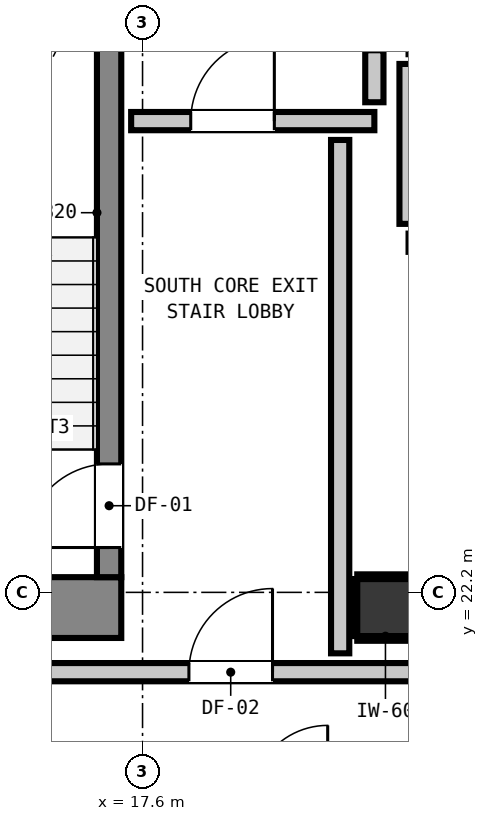
"""IFC4 building model, lengths in metres.
Left out: names, types, materials, properties, quantities, classifications, styles, units other than length and angle.
Written with IfcOpenShell. Run it as: python <this file> out.ifc"""

import sys

from ifc_helpers import new_model, si_unit, direction, frame, frame_2d, origin, origin_2d, place, context, subcontext, project, spatial, rectangle, extrude, element, fill, save


model = new_model("IFC4")
c1 = context("Model", 3, precision=1e-05, world=origin(), true_north=direction((0.0, 1.0)))
c2 = subcontext(c1, "Body", "Model", "MODEL_VIEW")
j1 = project(units=[si_unit("LENGTHUNIT", "METRE"), si_unit("PLANEANGLEUNIT", "RADIAN")], contexts=[c1])
p1 = place(None, origin())
s1 = spatial("IfcSite", under=j1, at=p1, CompositionType="ELEMENT")
p2 = place(p1, origin())
s2 = spatial("IfcBuilding", under=s1, at=p2, CompositionType="ELEMENT")
p3 = place(p2, frame((0.0, 0.0, 247.88)))
s3 = spatial("IfcBuildingStorey", under=s2, at=p3, CompositionType="ELEMENT", Elevation=247.88)
p4 = place(p3, frame((20.8, 22.0, 0.0), z_axis=(0.0, 0.0, 1.0), x_axis=(1.0, 0.0, 0.0)))
e1 = element("IfcColumn", 1, at=p4, inside=s3, PredefinedType="COLUMN", context=c2, shape_type="SweptSolid", body=[
    extrude(rectangle(XDim=0.75, YDim=0.75, at=origin_2d()), origin(), (0.0, 0.0, 1.0), 3.32),
])
p5 = place(p3, frame((13.24, 22.0, 0.0), z_axis=(0.0, 0.0, 1.0), x_axis=(1.0, 0.0, 0.0)))
e2 = element("IfcWall", 2, at=p5, inside=s3, PredefinedType="SHEAR", context=c2, shape_type="SweptSolid", body=[
    extrude(rectangle(XDim=4.08, YDim=0.8, at=frame_2d((2.04, 0.0))), origin(), (0.0, 0.0, 1.0), 3.32),
])
p6 = place(p3, frame((17.16, 22.4, 0.0), z_axis=(0.0, 0.0, 1.0), x_axis=(0.0, 1.0, 0.0)))
e3 = element("IfcWall", 3, at=p6, inside=s3, PredefinedType="SHEAR", context=c2, shape_type="SweptSolid", body=[
    extrude(rectangle(XDim=8.0, YDim=0.32, at=frame_2d((4.0, 0.0))), origin(), (0.0, 0.0, 1.0), 3.32),
])
p7 = place(p6, frame((0.39, 0.0, 0.0)))
e4 = element("IfcOpeningElement", 4, at=p7, cuts=e3, PredefinedType="OPENING", context=c2, shape_type="SweptSolid", body=[
    extrude(rectangle(XDim=1.1, YDim=2.15, at=frame_2d((0.55, 1.075))), frame((0.0, 0.17, 0.0), z_axis=(0.0, -1.0, 0.0), x_axis=(1.0, 0.0, 0.0)), (0.0, 0.0, 1.0), 0.34),
])
for number, where, z_axis, x_axis in (
    (5, (21.1, 26.8, 0.0), (0.0, 0.0, 1.0), (1.0, 0.0, 0.0)),
    (6, (21.1, 29.4, 0.0), (0.0, 0.0, 1.0), (1.0, 0.0, 0.0)),
):
    element("IfcWall", number, at=place(p3, frame(where, z_axis=z_axis, x_axis=x_axis)), inside=s3, PredefinedType="PARTITIONING", context=c2, shape_type="SweptSolid", body=[
        extrude(rectangle(XDim=2.2, YDim=0.24, at=frame_2d((1.1, 0.0))), origin(), (0.0, 0.0, 1.0), 2.9),
    ])
p8 = place(p3, frame((21.1, 27.048, 0.0), z_axis=(0.0, 0.0, 1.0), x_axis=(0.0, 1.0, 0.0)))
e7 = element("IfcWall", 7, at=p8, inside=s3, PredefinedType="PARTITIONING", context=c2, shape_type="SweptSolid", body=[
    extrude(rectangle(XDim=2.104, YDim=0.24, at=frame_2d((1.052, 0.0))), origin(), (0.0, 0.0, 1.0), 0.905),
])
p9 = place(p3, frame((10.787, 21.15, 0.0), z_axis=(0.0, 0.0, 1.0), x_axis=(1.0, 0.0, 0.0)))
e8 = element("IfcWall", 8, at=p9, inside=s3, PredefinedType="PARTITIONING", context=c2, shape_type="SweptSolid", body=[
    extrude(rectangle(XDim=36.626, YDim=0.24, at=frame_2d((18.313, 0.0))), origin(), (0.0, 0.0, 1.0), 2.9),
])
p10 = place(p9, frame((7.423, 0.0, 0.0)))
e9 = element("IfcOpeningElement", 9, at=p10, cuts=e8, PredefinedType="OPENING", context=c2, shape_type="SweptSolid", body=[
    extrude(rectangle(XDim=1.1, YDim=2.15, at=frame_2d((0.55, 1.075))), frame((0.0, 0.13, 0.0), z_axis=(0.0, -1.0, 0.0), x_axis=(1.0, 0.0, 0.0)), (0.0, 0.0, 1.0), 0.26),
])
p11 = place(p9, frame((29.788, 0.0, 0.0)))
e10 = element("IfcOpeningElement", 10, at=p11, cuts=e8, PredefinedType="OPENING", context=c2, shape_type="SweptSolid", body=[
    extrude(rectangle(XDim=1.0, YDim=2.15, at=frame_2d((0.5, 1.075))), frame((0.0, 0.13, 0.0), z_axis=(0.0, -1.0, 0.0), x_axis=(1.0, 0.0, 0.0)), (0.0, 0.0, 1.0), 0.26),
])
p12 = place(p3, frame((17.45, 28.4, 0.0), z_axis=(0.0, 0.0, 1.0), x_axis=(1.0, 0.0, 0.0)))
e11 = element("IfcWall", 11, at=p12, inside=s3, PredefinedType="PARTITIONING", context=c2, shape_type="SweptSolid", body=[
    extrude(rectangle(XDim=3.2, YDim=0.24, at=frame_2d((1.6, 0.0))), origin(), (0.0, 0.0, 1.0), 2.9),
])
p13 = place(p12, frame((0.784, 0.0, 0.0)))
e12 = element("IfcOpeningElement", 12, at=p13, cuts=e11, PredefinedType="OPENING", context=c2, shape_type="SweptSolid", body=[
    extrude(rectangle(XDim=1.1, YDim=2.15, at=frame_2d((0.55, 1.075))), frame((0.0, 0.13, 0.0), z_axis=(0.0, -1.0, 0.0), x_axis=(1.0, 0.0, 0.0)), (0.0, 0.0, 1.0), 0.26),
])
p14 = place(p3, frame((20.2, 21.398, 0.0), z_axis=(0.0, 0.0, 1.0), x_axis=(0.0, 1.0, 0.0)))
e13 = element("IfcWall", 13, at=p14, inside=s3, PredefinedType="PARTITIONING", context=c2, shape_type="SweptSolid", body=[
    extrude(rectangle(XDim=6.754, YDim=0.24, at=frame_2d((3.377, 0.0))), origin(), (0.0, 0.0, 1.0), 0.905),
])
p15 = place(p3, frame((20.65, 28.648, 0.0), z_axis=(0.0, 0.0, 1.0), x_axis=(0.0, 1.0, 0.0)))
e14 = element("IfcWall", 14, at=p15, inside=s3, PredefinedType="PARTITIONING", context=c2, shape_type="SweptSolid", body=[
    extrude(rectangle(XDim=0.684, YDim=0.24, at=frame_2d((0.342, 0.0))), origin(), (0.0, 0.0, 1.0), 0.905),
])
for number, where, z_axis, x_axis in (
    (15, (20.425, 21.593, 0.0), (0.0, 0.0, 1.0), (1.0, 0.0, 0.0)),
    (16, (20.425, 22.407, 0.0), (0.0, 0.0, 1.0), (1.0, 0.0, 0.0)),
):
    element("IfcWall", number, at=place(p3, frame(where, z_axis=z_axis, x_axis=x_axis)), inside=s3, PredefinedType="PARTITIONING", context=c2, shape_type="SweptSolid", body=[
        extrude(rectangle(XDim=0.742, YDim=0.06, at=frame_2d((0.371, 0.0))), origin(), (0.0, 0.0, 1.0), 0.905),
    ])
p16 = place(p3, frame((20.393, 21.625, 0.0), z_axis=(0.0, 0.0, 1.0), x_axis=(0.0, 1.0, 0.0)))
e17 = element("IfcWall", 17, at=p16, inside=s3, PredefinedType="PARTITIONING", context=c2, shape_type="SweptSolid", body=[
    extrude(rectangle(XDim=0.75, YDim=0.06, at=frame_2d((0.375, 0.0))), origin(), (0.0, 0.0, 1.0), 0.905),
])
p17 = place(p7, origin())
e18 = element("IfcDoor", 18, at=p17, inside=s3, OperationType="SINGLE_SWING_LEFT", PredefinedType="DOOR", context=c2, shape_type="SweptSolid", body=[
    extrude(rectangle(XDim=1.1, YDim=2.15, at=frame_2d((0.55, 1.075))), frame((0.0, 0.025, 0.0), z_axis=(0.0, -1.0, 0.0), x_axis=(1.0, 0.0, 0.0)), (0.0, 0.0, 1.0), 0.05),
])
fill(e4, e18)
p18 = place(p13, origin())
e19 = element("IfcDoor", 19, at=p18, inside=s3, OperationType="SINGLE_SWING_RIGHT", PredefinedType="DOOR", context=c2, shape_type="SweptSolid", body=[
    extrude(rectangle(XDim=1.1, YDim=2.15, at=frame_2d((0.55, 1.075))), frame((0.0, 0.025, 0.0), z_axis=(0.0, -1.0, 0.0), x_axis=(1.0, 0.0, 0.0)), (0.0, 0.0, 1.0), 0.05),
])
fill(e12, e19)
p19 = place(p10, origin())
e20 = element("IfcDoor", 20, at=p19, inside=s3, OperationType="SINGLE_SWING_RIGHT", PredefinedType="DOOR", context=c2, shape_type="SweptSolid", body=[
    extrude(rectangle(XDim=1.1, YDim=2.15, at=frame_2d((0.55, 1.075))), frame((0.0, 0.025, 0.0), z_axis=(0.0, -1.0, 0.0), x_axis=(1.0, 0.0, 0.0)), (0.0, 0.0, 1.0), 0.05),
])
fill(e9, e20)
save(model, sys.argv[1])
